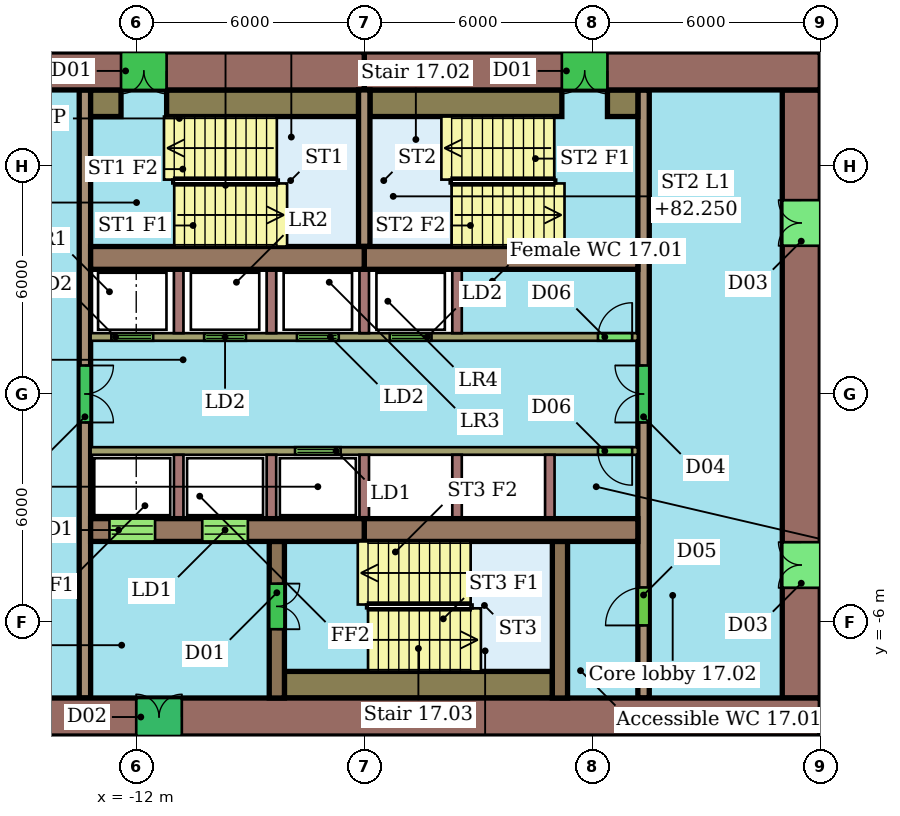
"""IFC4 building model, lengths in metres.
Left out: names, types, materials, properties, quantities, classifications, styles, units other than length and angle.
Written with IfcOpenShell. Run it as: python <this file> out.ifc"""

import sys

from ifc_helpers import new_model, si_unit, direction, frame, frame_2d, origin, place, context, subcontext, project, spatial, rectangle, extrude, element, fill, save


model = new_model("IFC4")
c1 = context("Model", 3, precision=1e-05, world=origin(), true_north=direction((0.0, 1.0)))
c2 = subcontext(c1, "Body", "Model", "MODEL_VIEW")
j1 = project(units=[si_unit("LENGTHUNIT", "METRE"), si_unit("PLANEANGLEUNIT", "RADIAN")], contexts=[c1])
p1 = place(None, origin())
s1 = spatial("IfcSite", under=j1, at=p1, CompositionType="ELEMENT")
p2 = place(p1, origin())
s2 = spatial("IfcBuilding", under=s1, at=p2, CompositionType="ELEMENT")
p3 = place(p2, frame((0.0, 0.0, 80.4)))
s3 = spatial("IfcBuildingStorey", under=s2, at=p3, CompositionType="ELEMENT", Elevation=80.4)
p4 = place(p3, frame((6.0, 8.5, 0.0), z_axis=(0.0, 0.0, 1.0), x_axis=(-1.0, 0.0, 0.0)))
e1 = element("IfcWall", 1, at=p4, inside=s3, PredefinedType="SHEAR", context=c2, shape_type="SweptSolid", body=[
    extrude(rectangle(XDim=12.0, YDim=1.0, at=frame_2d((6.0, 0.0))), origin(), (0.0, 0.0, 1.0), 3.4),
])
p5 = place(p4, frame((5.6, 0.0, 0.0)))
e2 = element("IfcOpeningElement", 2, at=p5, cuts=e1, PredefinedType="OPENING", context=c2, shape_type="SweptSolid", body=[
    extrude(rectangle(XDim=1.2, YDim=2.1, at=frame_2d((0.6, 1.05))), frame((0.0, 0.51, 0.0), z_axis=(0.0, -1.0, 0.0), x_axis=(1.0, 0.0, 0.0)), (0.0, 0.0, 1.0), 1.02),
])
p6 = place(p3, frame((-6.0, 8.5, 0.0), z_axis=(0.0, 0.0, 1.0), x_axis=(-1.0, 0.0, 0.0)))
e3 = element("IfcWall", 3, at=p6, inside=s3, PredefinedType="SHEAR", context=c2, shape_type="SweptSolid", body=[
    extrude(rectangle(XDim=12.0, YDim=1.0, at=frame_2d((6.0, 0.0))), origin(), (0.0, 0.0, 1.0), 3.4),
])
p7 = place(p6, frame((5.2, 0.0, 0.0)))
e4 = element("IfcOpeningElement", 4, at=p7, cuts=e3, PredefinedType="OPENING", context=c2, shape_type="SweptSolid", body=[
    extrude(rectangle(XDim=1.2, YDim=2.1, at=frame_2d((0.6, 1.05))), frame((0.0, 0.51, 0.0), z_axis=(0.0, -1.0, 0.0), x_axis=(1.0, 0.0, 0.0)), (0.0, 0.0, 1.0), 1.02),
])
p8 = place(p3, frame((-18.0, -8.5, 0.0), z_axis=(0.0, 0.0, 1.0), x_axis=(1.0, 0.0, 0.0)))
e5 = element("IfcWall", 5, at=p8, inside=s3, PredefinedType="SHEAR", context=c2, shape_type="SweptSolid", body=[
    extrude(rectangle(XDim=24.0, YDim=1.0, at=frame_2d((12.0, 0.0))), origin(), (0.0, 0.0, 1.0), 3.4),
])
p9 = place(p8, frame((6.0, 0.0, 0.0)))
e6 = element("IfcOpeningElement", 6, at=p9, cuts=e5, PredefinedType="OPENING", context=c2, shape_type="SweptSolid", body=[
    extrude(rectangle(XDim=1.2, YDim=2.1, at=frame_2d((0.6, 1.05))), frame((0.0, 0.51, 0.0), z_axis=(0.0, -1.0, 0.0), x_axis=(1.0, 0.0, 0.0)), (0.0, 0.0, 1.0), 1.02),
])
p10 = place(p3, frame((5.5, -8.0, 0.0), z_axis=(0.0, 0.0, 1.0), x_axis=(0.0, 1.0, 0.0)))
e7 = element("IfcWall", 7, at=p10, inside=s3, PredefinedType="SHEAR", context=c2, shape_type="SweptSolid", body=[
    extrude(rectangle(XDim=16.0, YDim=1.0, at=frame_2d((8.0, 0.0))), origin(), (0.0, 0.0, 1.0), 3.4),
])
p11 = place(p10, frame((2.9, 0.0, 0.0)))
e8 = element("IfcOpeningElement", 8, at=p11, cuts=e7, PredefinedType="OPENING", context=c2, shape_type="SweptSolid", body=[
    extrude(rectangle(XDim=1.2, YDim=2.1, at=frame_2d((0.6, 1.05))), frame((0.0, 0.51, 0.0), z_axis=(0.0, -1.0, 0.0), x_axis=(1.0, 0.0, 0.0)), (0.0, 0.0, 1.0), 1.02),
])
p12 = place(p10, frame((11.9, 0.0, 0.0)))
e9 = element("IfcOpeningElement", 9, at=p12, cuts=e7, PredefinedType="OPENING", context=c2, shape_type="SweptSolid", body=[
    extrude(rectangle(XDim=1.2, YDim=2.1, at=frame_2d((0.6, 1.05))), frame((0.0, 0.51, 0.0), z_axis=(0.0, -1.0, 0.0), x_axis=(1.0, 0.0, 0.0)), (0.0, 0.0, 1.0), 1.02),
])
for number, where, z_axis, x_axis in (
    (10, (-13.2, 3.58, 0.0), (0.0, 0.0, 1.0), (1.0, 0.0, 0.0)),
    (11, (-6.0, 3.58, 0.0), (0.0, 0.0, 1.0), (1.0, 0.0, 0.0)),
):
    element("IfcWall", number, at=place(p3, frame(where, z_axis=z_axis, x_axis=x_axis)), inside=s3, PredefinedType="SHEAR", context=c2, shape_type="SweptSolid", body=[
        extrude(rectangle(XDim=7.2, YDim=0.6, at=frame_2d((3.6, 0.0))), origin(), (0.0, 0.0, 1.0), 3.4),
    ])
p13 = place(p3, frame((-13.2, -3.58, 0.0), z_axis=(0.0, 0.0, 1.0), x_axis=(1.0, 0.0, 0.0)))
e12 = element("IfcWall", 12, at=p13, inside=s3, PredefinedType="SHEAR", context=c2, shape_type="SweptSolid", body=[
    extrude(rectangle(XDim=7.2, YDim=0.6, at=frame_2d((3.6, 0.0))), origin(), (0.0, 0.0, 1.0), 3.4),
])
p14 = place(p13, frame((0.496, 0.0, 0.0)))
e13 = element("IfcOpeningElement", 13, at=p14, cuts=e12, PredefinedType="OPENING", context=c2, shape_type="SweptSolid", body=[
    extrude(rectangle(XDim=1.2, YDim=2.1, at=frame_2d((0.6, 1.05))), frame((0.0, 0.31, 0.0), z_axis=(0.0, -1.0, 0.0), x_axis=(1.0, 0.0, 0.0)), (0.0, 0.0, 1.0), 0.62),
])
p15 = place(p13, frame((2.938, 0.0, 0.0)))
e14 = element("IfcOpeningElement", 14, at=p15, cuts=e12, PredefinedType="OPENING", context=c2, shape_type="SweptSolid", body=[
    extrude(rectangle(XDim=1.2, YDim=2.1, at=frame_2d((0.6, 1.05))), frame((0.0, 0.31, 0.0), z_axis=(0.0, -1.0, 0.0), x_axis=(1.0, 0.0, 0.0)), (0.0, 0.0, 1.0), 0.62),
])
p16 = place(p3, frame((-6.0, -3.58, 0.0), z_axis=(0.0, 0.0, 1.0), x_axis=(1.0, 0.0, 0.0)))
e15 = element("IfcWall", 15, at=p16, inside=s3, PredefinedType="SHEAR", context=c2, shape_type="SweptSolid", body=[
    extrude(rectangle(XDim=7.2, YDim=0.6, at=frame_2d((3.6, 0.0))), origin(), (0.0, 0.0, 1.0), 3.4),
])
p17 = place(p3, frame((-13.35, 8.0, 0.0), z_axis=(0.0, 0.0, 1.0), x_axis=(0.0, -1.0, 0.0)))
e16 = element("IfcWall", 16, at=p17, inside=s3, PredefinedType="SHEAR", context=c2, shape_type="SweptSolid", body=[
    extrude(rectangle(XDim=16.0, YDim=0.3, at=frame_2d((8.0, 0.0))), origin(), (0.0, 0.0, 1.0), 3.4),
])
p18 = place(p17, frame((7.25, 0.0, 0.0)))
e17 = element("IfcOpeningElement", 17, at=p18, cuts=e16, PredefinedType="OPENING", context=c2, shape_type="SweptSolid", body=[
    extrude(rectangle(XDim=1.5, YDim=2.1, at=frame_2d((0.75, 1.05))), frame((0.0, 0.16, 0.0), z_axis=(0.0, -1.0, 0.0), x_axis=(1.0, 0.0, 0.0)), (0.0, 0.0, 1.0), 0.32),
])
p19 = place(p3, frame((1.35, -8.0, 0.0), z_axis=(0.0, 0.0, 1.0), x_axis=(0.0, 1.0, 0.0)))
e18 = element("IfcWall", 18, at=p19, inside=s3, PredefinedType="SHEAR", context=c2, shape_type="SweptSolid", body=[
    extrude(rectangle(XDim=16.0, YDim=0.3, at=frame_2d((8.0, 0.0))), origin(), (0.0, 0.0, 1.0), 3.4),
])
p20 = place(p19, frame((1.91, 0.0, 0.0)))
e19 = element("IfcOpeningElement", 19, at=p20, cuts=e18, PredefinedType="OPENING", context=c2, shape_type="SweptSolid", body=[
    extrude(rectangle(XDim=1.0, YDim=2.1, at=frame_2d((0.5, 1.05))), frame((0.0, 0.16, 0.0), z_axis=(0.0, -1.0, 0.0), x_axis=(1.0, 0.0, 0.0)), (0.0, 0.0, 1.0), 0.32),
])
p21 = place(p19, frame((7.25, 0.0, 0.0)))
e20 = element("IfcOpeningElement", 20, at=p21, cuts=e18, PredefinedType="OPENING", context=c2, shape_type="SweptSolid", body=[
    extrude(rectangle(XDim=1.5, YDim=2.1, at=frame_2d((0.75, 1.05))), frame((0.0, 0.16, 0.0), z_axis=(0.0, -1.0, 0.0), x_axis=(1.0, 0.0, 0.0)), (0.0, 0.0, 1.0), 0.32),
])
p22 = place(p3, frame((-13.2, 1.5, 0.0), z_axis=(0.0, 0.0, 1.0), x_axis=(1.0, 0.0, 0.0)))
e21 = element("IfcWall", 21, at=p22, inside=s3, PredefinedType="SHEAR", context=c2, shape_type="SweptSolid", body=[
    extrude(rectangle(XDim=14.4, YDim=0.2, at=frame_2d((7.2, 0.0))), origin(), (0.0, 0.0, 1.0), 3.4),
])
p23 = place(p22, frame((0.546, 0.0, 0.0)))
e22 = element("IfcOpeningElement", 22, at=p23, cuts=e21, PredefinedType="OPENING", context=c2, shape_type="SweptSolid", body=[
    extrude(rectangle(XDim=1.1, YDim=2.1, at=frame_2d((0.55, 1.05))), frame((0.0, 0.11, 0.0), z_axis=(0.0, -1.0, 0.0), x_axis=(1.0, 0.0, 0.0)), (0.0, 0.0, 1.0), 0.22),
])
p24 = place(p22, frame((2.988, 0.0, 0.0)))
e23 = element("IfcOpeningElement", 23, at=p24, cuts=e21, PredefinedType="OPENING", context=c2, shape_type="SweptSolid", body=[
    extrude(rectangle(XDim=1.1, YDim=2.1, at=frame_2d((0.55, 1.05))), frame((0.0, 0.11, 0.0), z_axis=(0.0, -1.0, 0.0), x_axis=(1.0, 0.0, 0.0)), (0.0, 0.0, 1.0), 0.22),
])
p25 = place(p22, frame((5.429, 0.0, 0.0)))
e24 = element("IfcOpeningElement", 24, at=p25, cuts=e21, PredefinedType="OPENING", context=c2, shape_type="SweptSolid", body=[
    extrude(rectangle(XDim=1.1, YDim=2.1, at=frame_2d((0.55, 1.05))), frame((0.0, 0.11, 0.0), z_axis=(0.0, -1.0, 0.0), x_axis=(1.0, 0.0, 0.0)), (0.0, 0.0, 1.0), 0.22),
])
p26 = place(p22, frame((7.871, 0.0, 0.0)))
e25 = element("IfcOpeningElement", 25, at=p26, cuts=e21, PredefinedType="OPENING", context=c2, shape_type="SweptSolid", body=[
    extrude(rectangle(XDim=1.1, YDim=2.1, at=frame_2d((0.55, 1.05))), frame((0.0, 0.11, 0.0), z_axis=(0.0, -1.0, 0.0), x_axis=(1.0, 0.0, 0.0)), (0.0, 0.0, 1.0), 0.22),
])
p27 = place(p22, frame((13.35, 0.0, 0.0)))
e26 = element("IfcOpeningElement", 26, at=p27, cuts=e21, PredefinedType="OPENING", context=c2, shape_type="SweptSolid", body=[
    extrude(rectangle(XDim=0.9, YDim=2.1, at=frame_2d((0.45, 1.05))), frame((0.0, 0.11, 0.0), z_axis=(0.0, -1.0, 0.0), x_axis=(1.0, 0.0, 0.0)), (0.0, 0.0, 1.0), 0.22),
])
p28 = place(p3, frame((1.2, -1.5, 0.0), z_axis=(0.0, 0.0, 1.0), x_axis=(-1.0, 0.0, 0.0)))
e27 = element("IfcWall", 27, at=p28, inside=s3, PredefinedType="SHEAR", context=c2, shape_type="SweptSolid", body=[
    extrude(rectangle(XDim=14.4, YDim=0.2, at=frame_2d((7.2, 0.0))), origin(), (0.0, 0.0, 1.0), 3.4),
])
p29 = place(p28, frame((7.821, 0.0, 0.0)))
e28 = element("IfcOpeningElement", 28, at=p29, cuts=e27, PredefinedType="OPENING", context=c2, shape_type="SweptSolid", body=[
    extrude(rectangle(XDim=1.2, YDim=2.1, at=frame_2d((0.6, 1.05))), frame((0.0, 0.11, 0.0), z_axis=(0.0, -1.0, 0.0), x_axis=(1.0, 0.0, 0.0)), (0.0, 0.0, 1.0), 0.22),
])
p30 = place(p28, frame((0.15, 0.0, 0.0)))
e29 = element("IfcOpeningElement", 29, at=p30, cuts=e27, PredefinedType="OPENING", context=c2, shape_type="SweptSolid", body=[
    extrude(rectangle(XDim=0.9, YDim=2.1, at=frame_2d((0.45, 1.05))), frame((0.0, 0.11, 0.0), z_axis=(0.0, -1.0, 0.0), x_axis=(1.0, 0.0, 0.0)), (0.0, 0.0, 1.0), 0.22),
])
p31 = place(p3, frame((-8.3, -3.88, 0.0), z_axis=(0.0, 0.0, 1.0), x_axis=(0.0, -1.0, 0.0)))
e30 = element("IfcWall", 30, at=p31, inside=s3, PredefinedType="SHEAR", context=c2, shape_type="SweptSolid", body=[
    extrude(rectangle(XDim=4.12, YDim=0.4, at=frame_2d((2.06, 0.0))), origin(), (0.0, 0.0, 1.0), 3.4),
])
p32 = place(p31, frame((1.11, 0.0, 0.0)))
e31 = element("IfcOpeningElement", 31, at=p32, cuts=e30, PredefinedType="OPENING", context=c2, shape_type="SweptSolid", body=[
    extrude(rectangle(XDim=1.2, YDim=2.1, at=frame_2d((0.6, 1.05))), frame((0.0, 0.21, 0.0), z_axis=(0.0, -1.0, 0.0), x_axis=(1.0, 0.0, 0.0)), (0.0, 0.0, 1.0), 0.42),
])
p33 = place(p3, frame((-0.85, -3.88, 0.0), z_axis=(0.0, 0.0, 1.0), x_axis=(0.0, -1.0, 0.0)))
e32 = element("IfcWall", 32, at=p33, inside=s3, PredefinedType="SHEAR", context=c2, shape_type="SweptSolid", body=[
    extrude(rectangle(XDim=4.12, YDim=0.4, at=frame_2d((2.06, 0.0))), origin(), (0.0, 0.0, 1.0), 3.4),
])
p34 = place(p3, frame((-6.0, 3.88, 0.0), z_axis=(0.0, 0.0, 1.0), x_axis=(0.0, 1.0, 0.0)))
e33 = element("IfcWall", 33, at=p34, inside=s3, PredefinedType="SHEAR", context=c2, shape_type="SweptSolid", body=[
    extrude(rectangle(XDim=4.12, YDim=0.3, at=frame_2d((2.06, 0.0))), origin(), (0.0, 0.0, 1.0), 3.4),
])
p35 = place(p3, frame((-13.2, 7.65, 0.0), z_axis=(0.0, 0.0, 1.0), x_axis=(1.0, 0.0, 0.0)))
e34 = element("IfcWall", 34, at=p35, inside=s3, PredefinedType="SHEAR", context=c2, shape_type="SweptSolid", body=[
    extrude(rectangle(XDim=0.8, YDim=0.7, at=frame_2d((0.4, 0.0))), origin(), (0.0, 0.0, 1.0), 3.4),
])
for number, where, z_axis, x_axis in (
    (35, (-11.2, 7.65, 0.0), (0.0, 0.0, 1.0), (1.0, 0.0, 0.0)),
    (36, (-5.85, 7.65, 0.0), (0.0, 0.0, 1.0), (1.0, 0.0, 0.0)),
):
    element("IfcWall", number, at=place(p3, frame(where, z_axis=z_axis, x_axis=x_axis)), inside=s3, PredefinedType="SHEAR", context=c2, shape_type="SweptSolid", body=[
        extrude(rectangle(XDim=5.05, YDim=0.7, at=frame_2d((2.525, 0.0))), origin(), (0.0, 0.0, 1.0), 3.4),
    ])
p36 = place(p3, frame((0.4, 7.65, 0.0), z_axis=(0.0, 0.0, 1.0), x_axis=(1.0, 0.0, 0.0)))
e37 = element("IfcWall", 37, at=p36, inside=s3, PredefinedType="SHEAR", context=c2, shape_type="SweptSolid", body=[
    extrude(rectangle(XDim=0.8, YDim=0.7, at=frame_2d((0.4, 0.0))), origin(), (0.0, 0.0, 1.0), 3.4),
])
p37 = place(p3, frame((-8.1, -7.65, 0.0), z_axis=(0.0, 0.0, 1.0), x_axis=(1.0, 0.0, 0.0)))
e38 = element("IfcWall", 38, at=p37, inside=s3, PredefinedType="SHEAR", context=c2, shape_type="SweptSolid", body=[
    extrude(rectangle(XDim=7.05, YDim=0.7, at=frame_2d((3.525, 0.0))), origin(), (0.0, 0.0, 1.0), 3.4),
])
for number, where, z_axis, x_axis in (
    (39, (-10.883, 1.6, 0.0), (0.0, 0.0, 1.0), (0.0, 1.0, 0.0)),
    (40, (-8.442, 1.6, 0.0), (0.0, 0.0, 1.0), (0.0, 1.0, 0.0)),
    (41, (-6.0, 1.6, 0.0), (0.0, 0.0, 1.0), (0.0, 1.0, 0.0)),
    (42, (-3.558, 1.6, 0.0), (0.0, 0.0, 1.0), (0.0, 1.0, 0.0)),
    (43, (-10.883, -1.6, 0.0), (0.0, 0.0, 1.0), (0.0, -1.0, 0.0)),
    (44, (-8.442, -1.6, 0.0), (0.0, 0.0, 1.0), (0.0, -1.0, 0.0)),
    (45, (-6.0, -1.6, 0.0), (0.0, 0.0, 1.0), (0.0, -1.0, 0.0)),
    (46, (-3.558, -1.6, 0.0), (0.0, 0.0, 1.0), (0.0, -1.0, 0.0)),
    (47, (-1.117, -1.6, 0.0), (0.0, 0.0, 1.0), (0.0, -1.0, 0.0)),
):
    element("IfcWall", number, at=place(p3, frame(where, z_axis=z_axis, x_axis=x_axis)), inside=s3, PredefinedType="SHEAR", context=c2, shape_type="SweptSolid", body=[
        extrude(rectangle(XDim=1.68, YDim=0.25, at=frame_2d((0.84, 0.0))), origin(), (0.0, 0.0, 1.0), 3.4),
    ])
p38 = place(p5, origin())
e48 = element("IfcDoor", 48, at=p38, inside=s3, OperationType="DOUBLE_DOOR_SINGLE_SWING", PredefinedType="NOTDEFINED", context=c2, shape_type="SweptSolid", body=[
    extrude(rectangle(XDim=1.2, YDim=2.1, at=frame_2d((0.6, 1.05))), frame((0.0, 0.025, 0.0), z_axis=(0.0, -1.0, 0.0), x_axis=(1.0, 0.0, 0.0)), (0.0, 0.0, 1.0), 0.05),
])
fill(e2, e48)
p39 = place(p7, origin())
e49 = element("IfcDoor", 49, at=p39, inside=s3, OperationType="DOUBLE_DOOR_SINGLE_SWING", PredefinedType="NOTDEFINED", context=c2, shape_type="SweptSolid", body=[
    extrude(rectangle(XDim=1.2, YDim=2.1, at=frame_2d((0.6, 1.05))), frame((0.0, 0.025, 0.0), z_axis=(0.0, -1.0, 0.0), x_axis=(1.0, 0.0, 0.0)), (0.0, 0.0, 1.0), 0.05),
])
fill(e4, e49)
p40 = place(p9, origin())
e50 = element("IfcDoor", 50, at=p40, inside=s3, OperationType="DOUBLE_DOOR_SINGLE_SWING", PredefinedType="NOTDEFINED", context=c2, shape_type="SweptSolid", body=[
    extrude(rectangle(XDim=1.2, YDim=2.1, at=frame_2d((0.6, 1.05))), frame((0.0, 0.025, 0.0), z_axis=(0.0, -1.0, 0.0), x_axis=(1.0, 0.0, 0.0)), (0.0, 0.0, 1.0), 0.05),
])
fill(e6, e50)
p41 = place(p11, origin())
e51 = element("IfcDoor", 51, at=p41, inside=s3, OperationType="DOUBLE_DOOR_SINGLE_SWING", PredefinedType="NOTDEFINED", context=c2, shape_type="SweptSolid", body=[
    extrude(rectangle(XDim=1.2, YDim=2.1, at=frame_2d((0.6, 1.05))), frame((0.0, 0.025, 0.0), z_axis=(0.0, -1.0, 0.0), x_axis=(1.0, 0.0, 0.0)), (0.0, 0.0, 1.0), 0.05),
])
fill(e8, e51)
p42 = place(p12, origin())
e52 = element("IfcDoor", 52, at=p42, inside=s3, OperationType="DOUBLE_DOOR_SINGLE_SWING", PredefinedType="NOTDEFINED", context=c2, shape_type="SweptSolid", body=[
    extrude(rectangle(XDim=1.2, YDim=2.1, at=frame_2d((0.6, 1.05))), frame((0.0, 0.025, 0.0), z_axis=(0.0, -1.0, 0.0), x_axis=(1.0, 0.0, 0.0)), (0.0, 0.0, 1.0), 0.05),
])
fill(e9, e52)
p43 = place(p14, origin())
e53 = element("IfcDoor", 53, at=p43, inside=s3, OperationType="DOUBLE_DOOR_SLIDING", PredefinedType="NOTDEFINED", context=c2, shape_type="SweptSolid", body=[
    extrude(rectangle(XDim=1.2, YDim=2.1, at=frame_2d((0.6, 1.05))), frame((0.0, 0.025, 0.0), z_axis=(0.0, -1.0, 0.0), x_axis=(1.0, 0.0, 0.0)), (0.0, 0.0, 1.0), 0.05),
])
fill(e13, e53)
p44 = place(p15, origin())
e54 = element("IfcDoor", 54, at=p44, inside=s3, OperationType="DOUBLE_DOOR_SLIDING", PredefinedType="NOTDEFINED", context=c2, shape_type="SweptSolid", body=[
    extrude(rectangle(XDim=1.2, YDim=2.1, at=frame_2d((0.6, 1.05))), frame((0.0, 0.025, 0.0), z_axis=(0.0, -1.0, 0.0), x_axis=(1.0, 0.0, 0.0)), (0.0, 0.0, 1.0), 0.05),
])
fill(e14, e54)
p45 = place(p18, origin())
e55 = element("IfcDoor", 55, at=p45, inside=s3, OperationType="DOUBLE_DOOR_SINGLE_SWING", PredefinedType="NOTDEFINED", context=c2, shape_type="SweptSolid", body=[
    extrude(rectangle(XDim=1.5, YDim=2.1, at=frame_2d((0.75, 1.05))), frame((0.0, 0.025, 0.0), z_axis=(0.0, -1.0, 0.0), x_axis=(1.0, 0.0, 0.0)), (0.0, 0.0, 1.0), 0.05),
])
fill(e17, e55)
p46 = place(p20, origin())
e56 = element("IfcDoor", 56, at=p46, inside=s3, OperationType="SINGLE_SWING_LEFT", PredefinedType="NOTDEFINED", context=c2, shape_type="SweptSolid", body=[
    extrude(rectangle(XDim=1.0, YDim=2.1, at=frame_2d((0.5, 1.05))), frame((0.0, 0.025, 0.0), z_axis=(0.0, -1.0, 0.0), x_axis=(1.0, 0.0, 0.0)), (0.0, 0.0, 1.0), 0.05),
])
fill(e19, e56)
p47 = place(p21, origin())
e57 = element("IfcDoor", 57, at=p47, inside=s3, OperationType="DOUBLE_DOOR_SINGLE_SWING", PredefinedType="NOTDEFINED", context=c2, shape_type="SweptSolid", body=[
    extrude(rectangle(XDim=1.5, YDim=2.1, at=frame_2d((0.75, 1.05))), frame((0.0, 0.025, 0.0), z_axis=(0.0, -1.0, 0.0), x_axis=(1.0, 0.0, 0.0)), (0.0, 0.0, 1.0), 0.05),
])
fill(e20, e57)
p48 = place(p23, origin())
e58 = element("IfcDoor", 58, at=p48, inside=s3, OperationType="DOUBLE_DOOR_SLIDING", PredefinedType="NOTDEFINED", context=c2, shape_type="SweptSolid", body=[
    extrude(rectangle(XDim=1.1, YDim=2.1, at=frame_2d((0.55, 1.05))), frame((0.0, 0.025, 0.0), z_axis=(0.0, -1.0, 0.0), x_axis=(1.0, 0.0, 0.0)), (0.0, 0.0, 1.0), 0.05),
])
fill(e22, e58)
p49 = place(p24, origin())
e59 = element("IfcDoor", 59, at=p49, inside=s3, OperationType="DOUBLE_DOOR_SLIDING", PredefinedType="NOTDEFINED", context=c2, shape_type="SweptSolid", body=[
    extrude(rectangle(XDim=1.1, YDim=2.1, at=frame_2d((0.55, 1.05))), frame((0.0, 0.025, 0.0), z_axis=(0.0, -1.0, 0.0), x_axis=(1.0, 0.0, 0.0)), (0.0, 0.0, 1.0), 0.05),
])
fill(e23, e59)
p50 = place(p25, origin())
e60 = element("IfcDoor", 60, at=p50, inside=s3, OperationType="DOUBLE_DOOR_SLIDING", PredefinedType="NOTDEFINED", context=c2, shape_type="SweptSolid", body=[
    extrude(rectangle(XDim=1.1, YDim=2.1, at=frame_2d((0.55, 1.05))), frame((0.0, 0.025, 0.0), z_axis=(0.0, -1.0, 0.0), x_axis=(1.0, 0.0, 0.0)), (0.0, 0.0, 1.0), 0.05),
])
fill(e24, e60)
p51 = place(p26, origin())
e61 = element("IfcDoor", 61, at=p51, inside=s3, OperationType="DOUBLE_DOOR_SLIDING", PredefinedType="NOTDEFINED", context=c2, shape_type="SweptSolid", body=[
    extrude(rectangle(XDim=1.1, YDim=2.1, at=frame_2d((0.55, 1.05))), frame((0.0, 0.025, 0.0), z_axis=(0.0, -1.0, 0.0), x_axis=(1.0, 0.0, 0.0)), (0.0, 0.0, 1.0), 0.05),
])
fill(e25, e61)
p52 = place(p27, origin())
e62 = element("IfcDoor", 62, at=p52, inside=s3, OperationType="SINGLE_SWING_RIGHT", PredefinedType="NOTDEFINED", context=c2, shape_type="SweptSolid", body=[
    extrude(rectangle(XDim=0.9, YDim=2.1, at=frame_2d((0.45, 1.05))), frame((0.0, 0.025, 0.0), z_axis=(0.0, -1.0, 0.0), x_axis=(1.0, 0.0, 0.0)), (0.0, 0.0, 1.0), 0.05),
])
fill(e26, e62)
p53 = place(p29, origin())
e63 = element("IfcDoor", 63, at=p53, inside=s3, OperationType="DOUBLE_DOOR_SLIDING", PredefinedType="NOTDEFINED", context=c2, shape_type="SweptSolid", body=[
    extrude(rectangle(XDim=1.2, YDim=2.1, at=frame_2d((0.6, 1.05))), frame((0.0, 0.025, 0.0), z_axis=(0.0, -1.0, 0.0), x_axis=(1.0, 0.0, 0.0)), (0.0, 0.0, 1.0), 0.05),
])
fill(e28, e63)
p54 = place(p30, origin())
e64 = element("IfcDoor", 64, at=p54, inside=s3, OperationType="SINGLE_SWING_LEFT", PredefinedType="NOTDEFINED", context=c2, shape_type="SweptSolid", body=[
    extrude(rectangle(XDim=0.9, YDim=2.1, at=frame_2d((0.45, 1.05))), frame((0.0, 0.025, 0.0), z_axis=(0.0, -1.0, 0.0), x_axis=(1.0, 0.0, 0.0)), (0.0, 0.0, 1.0), 0.05),
])
fill(e29, e64)
p55 = place(p32, origin())
e65 = element("IfcDoor", 65, at=p55, inside=s3, OperationType="DOUBLE_DOOR_SINGLE_SWING", PredefinedType="NOTDEFINED", context=c2, shape_type="SweptSolid", body=[
    extrude(rectangle(XDim=1.2, YDim=2.1, at=frame_2d((0.6, 1.05))), frame((0.0, 0.025, 0.0), z_axis=(0.0, -1.0, 0.0), x_axis=(1.0, 0.0, 0.0)), (0.0, 0.0, 1.0), 0.05),
])
fill(e31, e65)
save(model, sys.argv[1])
